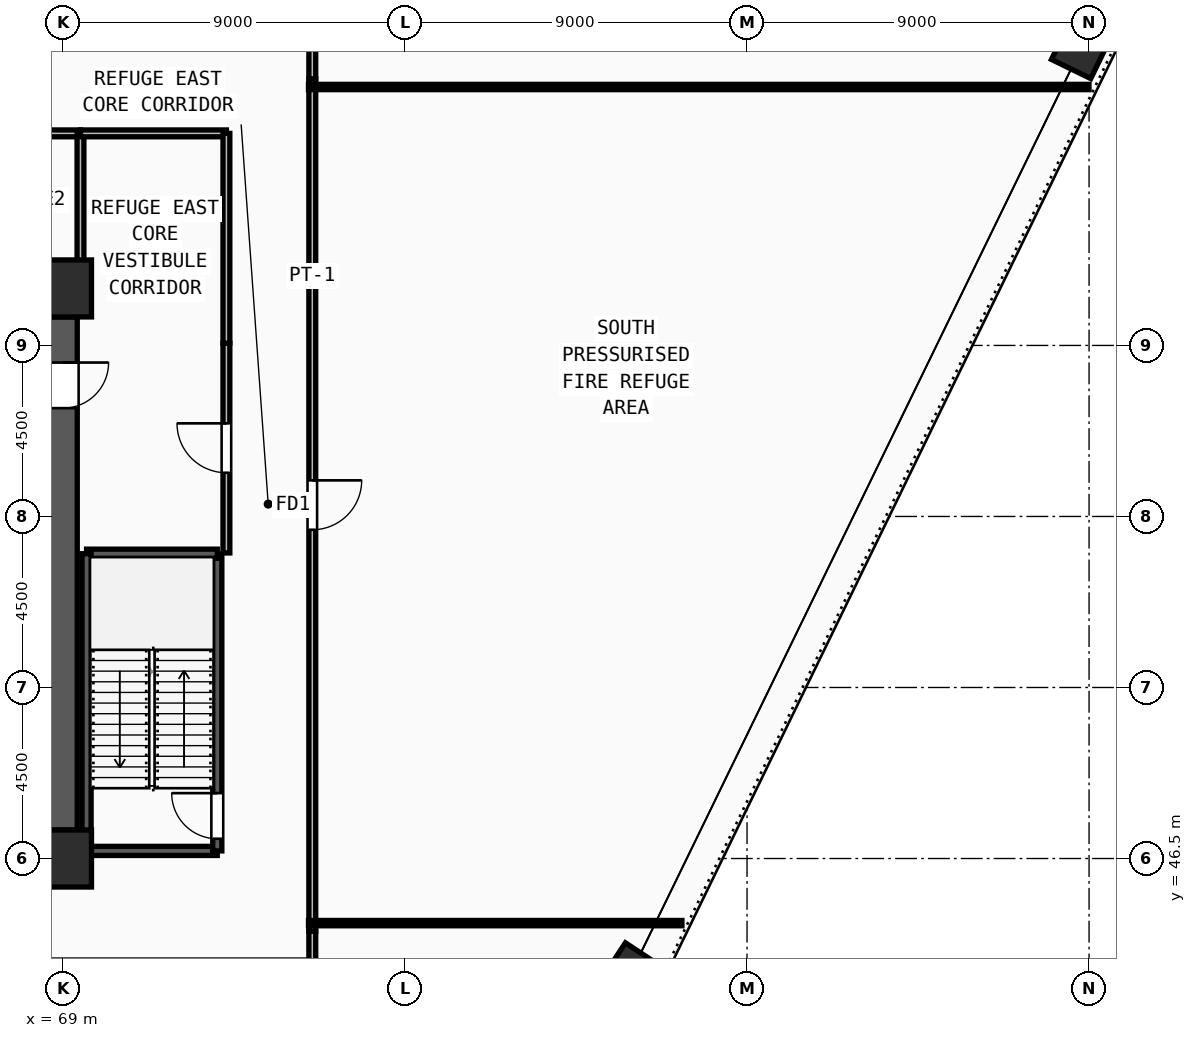
"""IFC4 building model, lengths in metres.
Left out: names, types, materials, properties, quantities, classifications, styles, units other than length and angle.
Written with IfcOpenShell. Run it as: python <this file> out.ifc"""

import sys

from ifc_helpers import new_model, si_unit, direction, frame, frame_2d, origin, origin_2d, place, context, subcontext, project, spatial, rectangle, extrude, source, transform, mapped, element, fill, save


model = new_model("IFC4")
c1 = context("Model", 3, precision=1e-05, world=origin(), true_north=direction((0.0, 1.0)))
c2 = subcontext(c1, "Body", "Model", "MODEL_VIEW")
j1 = project(units=[si_unit("LENGTHUNIT", "METRE"), si_unit("PLANEANGLEUNIT", "RADIAN")], contexts=[c1])
p1 = place(None, origin())
s1 = spatial("IfcSite", under=j1, at=p1, CompositionType="ELEMENT")
p2 = place(p1, origin())
s2 = spatial("IfcBuilding", under=s1, at=p2, CompositionType="ELEMENT")
p3 = place(p2, frame((0.0, 0.0, 139.5)))
s3 = spatial("IfcBuildingStorey", under=s2, at=p3, CompositionType="ELEMENT", Elevation=139.5)
m1 = source(origin(), c2, "Body", "SweptSolid", [
    extrude(rectangle(XDim=1.5, YDim=1.5, at=origin_2d()), origin(), (0.0, 0.0, 1.0), 4.5),
])
for number, where, z_axis, x_axis in (
    (1, (69.0, 46.5, 0.0), (0.0, 0.0, 1.0), (1.0, 0.0, 0.0)),
    (2, (69.0, 61.5, 0.0), (0.0, 0.0, 1.0), (1.0, 0.0, 0.0)),
):
    element("IfcColumn", number, at=place(p3, frame(where, z_axis=z_axis, x_axis=x_axis)), inside=s3, PredefinedType="COLUMN", context=c2, shape_type="MappedRepresentation", body=[
        mapped(m1, transform((0.0, 0.0, 0.0), x_axis=(1.0, 0.0, 0.0), y_axis=(0.0, 1.0, 0.0), z_axis=(0.0, 0.0, 1.0), scale=1.0)),
    ])
m2 = source(origin(), c2, "Body", "SweptSolid", [
    extrude(rectangle(XDim=1.4, YDim=1.15, at=origin_2d()), origin(), (0.0, 0.0, 1.0), 4.5),
])
for number, where, z_axis, x_axis in (
    (3, (95.834, 67.903, 0.0), (0.0, 0.0, 1.0), (0.438, 0.899, 0.0)),
    (4, (83.895, 43.38, 0.0), (0.0, 0.0, 1.0), (0.55, 0.835, 0.0)),
):
    element("IfcColumn", number, at=place(p3, frame(where, z_axis=z_axis, x_axis=x_axis)), inside=s3, PredefinedType="COLUMN", context=c2, shape_type="MappedRepresentation", body=[
        mapped(m2, transform((0.0, 0.0, 0.0), x_axis=(1.0, 0.0, 0.0), y_axis=(0.0, 1.0, 0.0), z_axis=(0.0, 0.0, 1.0), scale=1.0)),
    ])
p4 = place(p3, frame((69.0, 60.75, 0.0), z_axis=(0.0, 0.0, 1.0), x_axis=(0.0, -1.0, 0.0)))
e5 = element("IfcWall", 5, at=p4, inside=s3, PredefinedType="SHEAR", context=c2, shape_type="SweptSolid", body=[
    extrude(rectangle(XDim=13.5, YDim=0.75, at=frame_2d((6.75, 0.0))), origin(), (0.0, 0.0, 1.0), 4.32),
])
m3 = source(origin(), c2, "Body", "SweptSolid", [
    extrude(rectangle(XDim=1.2, YDim=2.2, at=frame_2d((0.6, 1.1))), frame((0.0, 0.385, 0.0), z_axis=(0.0, -1.0, 0.0), x_axis=(1.0, 0.0, 0.0)), (0.0, 0.0, 1.0), 0.77),
])
p5 = place(p4, frame((1.2, 0.0, 0.0)))
e6 = element("IfcOpeningElement", 6, at=p5, cuts=e5, PredefinedType="OPENING", context=c2, shape_type="MappedRepresentation", body=[
    mapped(m3, transform((0.0, 0.0, 0.0), x_axis=(1.0, 0.0, 0.0), y_axis=(0.0, 1.0, 0.0), z_axis=(0.0, 0.0, 1.0), scale=1.0)),
])
p6 = place(p3, frame((69.62, 46.7, 0.0), z_axis=(0.0, 0.0, 1.0), x_axis=(1.0, 0.0, 0.0)))
e7 = element("IfcWall", 7, at=p6, inside=s3, PredefinedType="SOLIDWALL", context=c2, shape_type="SweptSolid", body=[
    extrude(rectangle(XDim=3.44, YDim=0.24, at=frame_2d((1.72, 0.0))), origin(), (0.0, 0.0, 1.0), 4.32),
])
p7 = place(p3, frame((73.06, 46.7, 0.0), z_axis=(0.0, 0.0, 1.0), x_axis=(0.0, 1.0, 0.0)))
e8 = element("IfcWall", 8, at=p7, inside=s3, PredefinedType="SOLIDWALL", context=c2, shape_type="SweptSolid", body=[
    extrude(rectangle(XDim=7.82, YDim=0.24, at=frame_2d((3.91, 0.0))), origin(), (0.0, 0.0, 1.0), 4.32),
])
m4 = source(origin(), c2, "Body", "SweptSolid", [
    extrude(rectangle(XDim=1.2, YDim=2.2, at=frame_2d((0.6, 1.1))), frame((0.0, 0.13, 0.0), z_axis=(0.0, -1.0, 0.0), x_axis=(1.0, 0.0, 0.0)), (0.0, 0.0, 1.0), 0.26),
])
p8 = place(p7, frame((0.32, 0.0, 0.0)))
e9 = element("IfcOpeningElement", 9, at=p8, cuts=e8, PredefinedType="OPENING", context=c2, shape_type="MappedRepresentation", body=[
    mapped(m4, transform((0.0, 0.0, 0.0), x_axis=(1.0, 0.0, 0.0), y_axis=(0.0, 1.0, 0.0), z_axis=(0.0, 0.0, 1.0), scale=1.0)),
])
p9 = place(p3, frame((73.06, 54.52, 0.0), z_axis=(0.0, 0.0, 1.0), x_axis=(-1.0, 0.0, 0.0)))
e10 = element("IfcWall", 10, at=p9, inside=s3, PredefinedType="SOLIDWALL", context=c2, shape_type="SweptSolid", body=[
    extrude(rectangle(XDim=3.44, YDim=0.24, at=frame_2d((1.72, 0.0))), origin(), (0.0, 0.0, 1.0), 4.32),
])
p10 = place(p3, frame((69.62, 54.52, 0.0), z_axis=(0.0, 0.0, 1.0), x_axis=(0.0, -1.0, 0.0)))
e11 = element("IfcWall", 11, at=p10, inside=s3, PredefinedType="SOLIDWALL", context=c2, shape_type="SweptSolid", body=[
    extrude(rectangle(XDim=7.82, YDim=0.24, at=frame_2d((3.91, 0.0))), origin(), (0.0, 0.0, 1.0), 4.32),
])
p11 = place(p3, frame((65.92, 65.58, 0.0), z_axis=(0.0, 0.0, 1.0), x_axis=(1.0, 0.0, 0.0)))
e12 = element("IfcWall", 12, at=p11, inside=s3, PredefinedType="PARTITIONING", context=c2, shape_type="SweptSolid", body=[
    extrude(rectangle(XDim=3.54, YDim=0.18, at=frame_2d((1.77, 0.0))), origin(), (0.0, 0.0, 1.0), 4.32),
])
m5 = source(origin(), c2, "Body", "SweptSolid", [
    extrude(rectangle(XDim=1.0, YDim=2.2, at=frame_2d((0.5, 1.1))), frame((0.0, 0.1, 0.0), z_axis=(0.0, -1.0, 0.0), x_axis=(1.0, 0.0, 0.0)), (0.0, 0.0, 1.0), 0.2),
])
p12 = place(p11, frame((1.27, 0.0, 0.0)))
e13 = element("IfcOpeningElement", 13, at=p12, cuts=e12, PredefinedType="OPENING", context=c2, shape_type="MappedRepresentation", body=[
    mapped(m5, transform((0.0, 0.0, 0.0), x_axis=(1.0, 0.0, 0.0), y_axis=(0.0, 1.0, 0.0), z_axis=(0.0, 0.0, 1.0), scale=1.0)),
])
p13 = place(p3, frame((73.3, 54.54, 0.0), z_axis=(0.0, 0.0, 1.0), x_axis=(0.0, 1.0, 0.0)))
e14 = element("IfcWall", 14, at=p13, inside=s3, PredefinedType="PARTITIONING", context=c2, shape_type="SweptSolid", body=[
    extrude(rectangle(XDim=5.52, YDim=0.18, at=frame_2d((2.76, 0.0))), origin(), (0.0, 0.0, 1.0), 4.32),
])
m6 = source(origin(), c2, "Body", "SweptSolid", [
    extrude(rectangle(XDim=1.3, YDim=2.2, at=frame_2d((0.65, 1.1))), frame((0.0, 0.1, 0.0), z_axis=(0.0, -1.0, 0.0), x_axis=(1.0, 0.0, 0.0)), (0.0, 0.0, 1.0), 0.2),
])
p14 = place(p13, frame((2.11, 0.0, 0.0)))
e15 = element("IfcOpeningElement", 15, at=p14, cuts=e14, PredefinedType="OPENING", context=c2, shape_type="MappedRepresentation", body=[
    mapped(m6, transform((0.0, 0.0, 0.0), x_axis=(1.0, 0.0, 0.0), y_axis=(0.0, 1.0, 0.0), z_axis=(0.0, 0.0, 1.0), scale=1.0)),
])
p15 = place(p3, frame((75.56, 67.015, 0.0), z_axis=(0.0, 0.0, 1.0), x_axis=(0.0, -1.0, 0.0)))
e16 = element("IfcWall", 16, at=p15, inside=s3, PredefinedType="PARTITIONING", context=c2, shape_type="SweptSolid", body=[
    extrude(rectangle(XDim=22.43, YDim=0.18, at=frame_2d((11.215, 0.0))), origin(), (0.0, 0.0, 1.0), 3.905),
])
p16 = place(p15, frame((10.565, 0.0, 0.0)))
e17 = element("IfcOpeningElement", 17, at=p16, cuts=e16, PredefinedType="OPENING", context=c2, shape_type="MappedRepresentation", body=[
    mapped(m6, transform((0.0, 0.0, 0.0), x_axis=(1.0, 0.0, 0.0), y_axis=(0.0, 1.0, 0.0), z_axis=(0.0, 0.0, 1.0), scale=1.0)),
])
p17 = place(p3, frame((69.46, 61.95, 0.0), z_axis=(0.0, 0.0, 1.0), x_axis=(0.0, 1.0, 0.0)))
e18 = element("IfcWall", 18, at=p17, inside=s3, PredefinedType="PARTITIONING", context=c2, shape_type="SweptSolid", body=[
    extrude(rectangle(XDim=3.63, YDim=0.18, at=frame_2d((1.815, 0.0))), origin(), (0.0, 0.0, 1.0), 4.32),
])
p18 = place(p3, frame((69.46, 65.58, 0.0), z_axis=(0.0, 0.0, 1.0), x_axis=(1.0, 0.0, 0.0)))
e19 = element("IfcWall", 19, at=p18, inside=s3, PredefinedType="PARTITIONING", context=c2, shape_type="SweptSolid", body=[
    extrude(rectangle(XDim=3.84, YDim=0.18, at=frame_2d((1.92, 0.0))), origin(), (0.0, 0.0, 1.0), 4.32),
])
p19 = place(p3, frame((73.3, 60.06, 0.0), z_axis=(0.0, 0.0, 1.0), x_axis=(0.0, 1.0, 0.0)))
e20 = element("IfcWall", 20, at=p19, inside=s3, PredefinedType="PARTITIONING", context=c2, shape_type="SweptSolid", body=[
    extrude(rectangle(XDim=5.52, YDim=0.18, at=frame_2d((2.76, 0.0))), origin(), (0.0, 0.0, 1.0), 4.32),
])
p20 = place(p3, frame((75.56, 67.98, 0.0), z_axis=(0.0, 0.0, 1.0), x_axis=(0.0, -1.0, 0.0)))
e21 = element("IfcWall", 21, at=p20, inside=s3, PredefinedType="PARTITIONING", context=c2, shape_type="SweptSolid", body=[
    extrude(rectangle(XDim=0.965, YDim=0.18, at=frame_2d((0.482, 0.0))), origin(), (0.0, 0.0, 1.0), 4.32),
])
p21 = place(p3, frame((75.56, 44.585, 0.0), z_axis=(0.0, 0.0, 1.0), x_axis=(0.0, -1.0, 0.0)))
e22 = element("IfcWall", 22, at=p21, inside=s3, PredefinedType="PARTITIONING", context=c2, shape_type="SweptSolid", body=[
    extrude(rectangle(XDim=0.915, YDim=0.18, at=frame_2d((0.458, 0.0))), origin(), (0.0, 0.0, 1.0), 4.32),
])
p22 = place(p3, frame((75.46, 44.8, 0.0), z_axis=(0.0, 0.0, 1.0), x_axis=(1.0, 0.0, 0.0)))
e23 = element("IfcWall", 23, at=p22, inside=s3, PredefinedType="PARTITIONING", context=c2, shape_type="SweptSolid", body=[
    extrude(rectangle(XDim=9.827, YDim=0.14, at=frame_2d((4.914, 0.0))), origin(), (0.0, 0.0, 1.0), 4.32),
])
p23 = place(p3, frame((75.46, 66.8, 0.0), z_axis=(0.0, 0.0, 1.0), x_axis=(1.0, 0.0, 0.0)))
e24 = element("IfcWall", 24, at=p23, inside=s3, PredefinedType="PARTITIONING", context=c2, shape_type="SweptSolid", body=[
    extrude(rectangle(XDim=20.538, YDim=0.14, at=frame_2d((10.269, 0.0))), origin(), (0.0, 0.0, 1.0), 3.505),
])
m7 = source(origin(), c2, "Body", "SweptSolid", [
    extrude(rectangle(XDim=1.2, YDim=2.2, at=frame_2d((0.6, 1.1))), frame((0.0, 0.025, 0.0), z_axis=(0.0, -1.0, 0.0), x_axis=(1.0, 0.0, 0.0)), (0.0, 0.0, 1.0), 0.05),
])
p24 = place(p5, origin())
e25 = element("IfcDoor", 25, at=p24, inside=s3, OperationType="SINGLE_SWING_LEFT", PredefinedType="DOOR", context=c2, shape_type="MappedRepresentation", body=[
    mapped(m7, transform((0.0, 0.0, 0.0), x_axis=(1.0, 0.0, 0.0), y_axis=(0.0, 1.0, 0.0), z_axis=(0.0, 0.0, 1.0), scale=1.0)),
])
fill(e6, e25)
p25 = place(p8, origin())
e26 = element("IfcDoor", 26, at=p25, inside=s3, OperationType="SINGLE_SWING_RIGHT", PredefinedType="DOOR", context=c2, shape_type="MappedRepresentation", body=[
    mapped(m7, transform((0.0, 0.0, 0.0), x_axis=(1.0, 0.0, 0.0), y_axis=(0.0, 1.0, 0.0), z_axis=(0.0, 0.0, 1.0), scale=1.0)),
])
fill(e9, e26)
m8 = source(origin(), c2, "Body", "SweptSolid", [
    extrude(rectangle(XDim=1.3, YDim=2.2, at=frame_2d((0.65, 1.1))), frame((0.0, 0.025, 0.0), z_axis=(0.0, -1.0, 0.0), x_axis=(1.0, 0.0, 0.0)), (0.0, 0.0, 1.0), 0.05),
])
p26 = place(p14, origin())
e27 = element("IfcDoor", 27, at=p26, inside=s3, OperationType="SINGLE_SWING_RIGHT", PredefinedType="DOOR", context=c2, shape_type="MappedRepresentation", body=[
    mapped(m8, transform((0.0, 0.0, 0.0), x_axis=(1.0, 0.0, 0.0), y_axis=(0.0, 1.0, 0.0), z_axis=(0.0, 0.0, 1.0), scale=1.0)),
])
fill(e15, e27)
p27 = place(p16, origin())
e28 = element("IfcDoor", 28, at=p27, inside=s3, OperationType="SINGLE_SWING_LEFT", PredefinedType="DOOR", context=c2, shape_type="MappedRepresentation", body=[
    mapped(m8, transform((0.0, 0.0, 0.0), x_axis=(1.0, 0.0, 0.0), y_axis=(0.0, 1.0, 0.0), z_axis=(0.0, 0.0, 1.0), scale=1.0)),
])
fill(e17, e28)
save(model, sys.argv[1])
